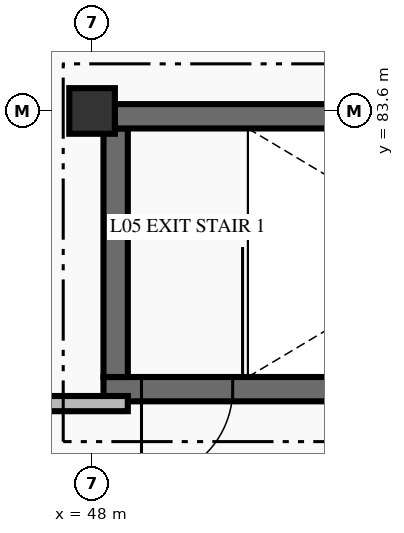
"""IFC4 building model, lengths in metres.
Left out: names, types, materials, properties, quantities, classifications, styles, units other than length and angle.
Written with IfcOpenShell. Run it as: python <this file> out.ifc"""

import sys

from ifc_helpers import new_model, si_unit, direction, frame, frame_2d, origin, origin_2d, place, context, subcontext, project, spatial, rectangle, extrude, element, fill, save


model = new_model("IFC4")
c1 = context("Model", 3, precision=1e-05, world=origin(), true_north=direction((0.0, 1.0)))
c2 = subcontext(c1, "Body", "Model", "MODEL_VIEW")
j1 = project(units=[si_unit("LENGTHUNIT", "METRE"), si_unit("PLANEANGLEUNIT", "RADIAN")], contexts=[c1])
p1 = place(None, origin())
s1 = spatial("IfcSite", under=j1, at=p1, CompositionType="ELEMENT")
p2 = place(p1, origin())
s2 = spatial("IfcBuilding", under=s1, at=p2, CompositionType="ELEMENT")
p3 = place(p2, frame((0.0, 0.0, 18.9)))
s3 = spatial("IfcBuildingStorey", under=s2, at=p3, CompositionType="ELEMENT", Elevation=18.9)
p4 = place(p3, frame((48.0, 83.6, 0.0), z_axis=(0.0, 0.0, 1.0), x_axis=(1.0, 0.0, 0.0)))
e1 = element("IfcColumn", 1, at=p4, inside=s3, PredefinedType="COLUMN", context=c2, shape_type="SweptSolid", body=[
    extrude(rectangle(XDim=0.6, YDim=0.6, at=origin_2d()), origin(), (0.0, 0.0, 1.0), 4.8),
])
p5 = place(p3, frame((55.85, 79.94, 0.0), z_axis=(0.0, 0.0, 1.0), x_axis=(-1.0, 0.0, 0.0)))
e2 = element("IfcWall", 2, at=p5, inside=s3, PredefinedType="SHEAR", context=c2, shape_type="SweptSolid", body=[
    extrude(rectangle(XDim=7.7, YDim=0.32, at=frame_2d((3.85, 0.0))), origin(), (0.0, 0.0, 1.0), 4.57),
])
p6 = place(p5, frame((6.0, 0.0, 0.0)))
e3 = element("IfcOpeningElement", 3, at=p6, cuts=e2, PredefinedType="OPENING", context=c2, shape_type="SweptSolid", body=[
    extrude(rectangle(XDim=1.2, YDim=2.2, at=frame_2d((0.6, 1.1))), frame((0.0, 0.17, 0.0), z_axis=(0.0, -1.0, 0.0), x_axis=(1.0, 0.0, 0.0)), (0.0, 0.0, 1.0), 0.34),
])
p7 = place(p3, frame((48.31, 80.1, 0.0), z_axis=(0.0, 0.0, 1.0), x_axis=(0.0, 1.0, 0.0)))
e4 = element("IfcWall", 4, at=p7, inside=s3, PredefinedType="SHEAR", context=c2, shape_type="SweptSolid", body=[
    extrude(rectangle(XDim=3.27, YDim=0.32, at=frame_2d((1.635, 0.0))), origin(), (0.0, 0.0, 1.0), 4.57),
])
p8 = place(p3, frame((48.15, 83.53, 0.0), z_axis=(0.0, 0.0, 1.0), x_axis=(1.0, 0.0, 0.0)))
e5 = element("IfcWall", 5, at=p8, inside=s3, PredefinedType="SHEAR", context=c2, shape_type="SweptSolid", body=[
    extrude(rectangle(XDim=7.7, YDim=0.32, at=frame_2d((3.85, 0.0))), origin(), (0.0, 0.0, 1.0), 4.57),
])
p9 = place(p3, frame((48.47, 79.75, 0.0), z_axis=(0.0, 0.0, 1.0), x_axis=(-1.0, 0.0, 0.0)))
e6 = element("IfcWall", 6, at=p9, inside=s3, PredefinedType="STANDARD", context=c2, shape_type="SweptSolid", body=[
    extrude(rectangle(XDim=12.345, YDim=0.2, at=frame_2d((6.172, 0.0))), origin(), (0.0, 0.0, 1.0), 4.57),
])
p10 = place(p9, frame((5.333, 0.0, 0.0)))
e7 = element("IfcOpeningElement", 7, at=p10, cuts=e6, PredefinedType="OPENING", context=c2, shape_type="SweptSolid", body=[
    extrude(rectangle(XDim=1.68, YDim=2.34, at=frame_2d((0.84, 1.17))), frame((0.0, 0.11, 0.0), z_axis=(0.0, -1.0, 0.0), x_axis=(1.0, 0.0, 0.0)), (0.0, 0.0, 1.0), 0.22),
])
p11 = place(p9, frame((7.333, 0.0, 0.0)))
e8 = element("IfcOpeningElement", 8, at=p11, cuts=e6, PredefinedType="OPENING", context=c2, shape_type="SweptSolid", body=[
    extrude(rectangle(XDim=1.68, YDim=2.34, at=frame_2d((0.84, 1.17))), frame((0.0, 0.11, 0.0), z_axis=(0.0, -1.0, 0.0), x_axis=(1.0, 0.0, 0.0)), (0.0, 0.0, 1.0), 0.22),
])
p12 = place(p6, origin())
e9 = element("IfcDoor", 9, at=p12, inside=s3, OperationType="SINGLE_SWING_RIGHT", PredefinedType="DOOR", context=c2, shape_type="SweptSolid", body=[
    extrude(rectangle(XDim=1.2, YDim=2.2, at=frame_2d((0.6, 1.1))), frame((0.0, 0.025, 0.0), z_axis=(0.0, -1.0, 0.0), x_axis=(1.0, 0.0, 0.0)), (0.0, 0.0, 1.0), 0.05),
])
fill(e3, e9)
save(model, sys.argv[1])
